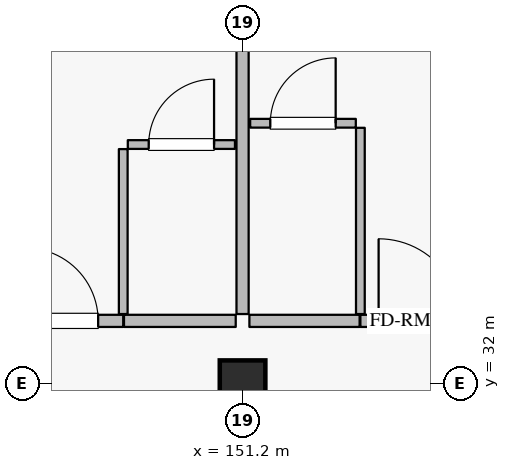
"""IFC4 building model, lengths in metres.
Left out: names, types, materials, properties, quantities, classifications, styles, units other than length and angle.
Written with IfcOpenShell. Run it as: python <this file> out.ifc"""

import sys

from ifc_helpers import new_model, si_unit, direction, frame, frame_2d, origin, origin_2d, place, context, subcontext, project, spatial, rectangle, extrude, element, fill, save


model = new_model("IFC4")
c1 = context("Model", 3, precision=1e-05, world=origin(), true_north=direction((0.0, 1.0)))
c2 = subcontext(c1, "Body", "Model", "MODEL_VIEW")
j1 = project(units=[si_unit("LENGTHUNIT", "METRE"), si_unit("PLANEANGLEUNIT", "RADIAN")], contexts=[c1])
p1 = place(None, origin())
s1 = spatial("IfcSite", under=j1, at=p1, CompositionType="ELEMENT")
p2 = place(p1, origin())
s2 = spatial("IfcBuilding", under=s1, at=p2, CompositionType="ELEMENT")
p3 = place(p2, frame((0.0, 0.0, 36.0)))
s3 = spatial("IfcBuildingStorey", under=s2, at=p3, CompositionType="ELEMENT", Elevation=36.0)
p4 = place(p3, frame((151.2, 32.0, 0.0), z_axis=(0.0, 0.0, 1.0), x_axis=(1.0, 0.0, 0.0)))
e1 = element("IfcColumn", 1, at=p4, inside=s3, PredefinedType="COLUMN", context=c2, shape_type="SweptSolid", body=[
    extrude(rectangle(XDim=0.6, YDim=0.6, at=origin_2d()), origin(), (0.0, 0.0, 1.0), 3.6),
])
p5 = place(p3, frame((143.15, 32.333, 0.0), z_axis=(0.0, 0.0, 1.0), x_axis=(0.724116091282, 0.689678103427, 0.0)))
e2 = element("IfcWall", 2, at=p5, inside=s3, PredefinedType="SOLIDWALL", context=c2, shape_type="SweptSolid", body=[
    extrude(rectangle(XDim=10.634, YDim=0.24, at=frame_2d((5.317, 0.0))), origin(), (0.0, 0.0, 1.0), 2.94),
])
p6 = place(p5, frame((0.16, 0.0, 0.8)))
e3 = element("IfcOpeningElement", 3, at=p6, cuts=e2, PredefinedType="OPENING", context=c2, shape_type="SweptSolid", body=[
    extrude(rectangle(XDim=1.6, YDim=1.6, at=frame_2d((0.8, 0.8))), frame((0.0, 0.13, 0.0), z_axis=(0.0, -1.0, 0.0), x_axis=(1.0, 0.0, 0.0)), (0.0, 0.0, 1.0), 0.26),
])
p7 = place(p5, frame((3.523, 0.0, 0.8)))
e4 = element("IfcOpeningElement", 4, at=p7, cuts=e2, PredefinedType="OPENING", context=c2, shape_type="SweptSolid", body=[
    extrude(rectangle(XDim=1.6, YDim=1.6, at=frame_2d((0.8, 0.8))), frame((0.0, 0.13, 0.0), z_axis=(0.0, -1.0, 0.0), x_axis=(1.0, 0.0, 0.0)), (0.0, 0.0, 1.0), 0.26),
])
p8 = place(p5, frame((7.88, 0.0, 0.8)))
e5 = element("IfcOpeningElement", 5, at=p8, cuts=e2, PredefinedType="OPENING", context=c2, shape_type="SweptSolid", body=[
    extrude(rectangle(XDim=1.6, YDim=1.6, at=frame_2d((0.8, 0.8))), frame((0.0, 0.13, 0.0), z_axis=(0.0, -1.0, 0.0), x_axis=(1.0, 0.0, 0.0)), (0.0, 0.0, 1.0), 0.26),
])
p9 = place(p3, frame((148.01, 32.82, 0.0), z_axis=(0.0, 0.0, 1.0), x_axis=(1.0, 0.0, 0.0)))
e6 = element("IfcWall", 6, at=p9, inside=s3, PredefinedType="PARTITIONING", context=c2, shape_type="SweptSolid", body=[
    extrude(rectangle(XDim=1.62, YDim=0.16, at=frame_2d((0.81, 0.0))), origin(), (0.0, 0.0, 1.0), 3.365),
])
p10 = place(p9, frame((0.33, 0.0, 0.0)))
e7 = element("IfcOpeningElement", 7, at=p10, cuts=e6, PredefinedType="OPENING", context=c2, shape_type="SweptSolid", body=[
    extrude(rectangle(XDim=0.96, YDim=2.2, at=frame_2d((0.48, 1.1))), frame((0.0, 0.09, 0.0), z_axis=(0.0, -1.0, 0.0), x_axis=(1.0, 0.0, 0.0)), (0.0, 0.0, 1.0), 0.18),
])
p11 = place(p3, frame((149.64, 32.82, 0.0), z_axis=(0.0, 0.0, 1.0), x_axis=(1.0, 0.0, 0.0)))
e8 = element("IfcWall", 8, at=p11, inside=s3, PredefinedType="PARTITIONING", context=c2, shape_type="SweptSolid", body=[
    extrude(rectangle(XDim=1.47, YDim=0.16, at=frame_2d((0.735, 0.0))), origin(), (0.0, 0.0, 1.0), 3.365),
])
p12 = place(p3, frame((149.63, 32.91, 0.0), z_axis=(0.0, 0.0, 1.0), x_axis=(0.0, 1.0, 0.0)))
e9 = element("IfcWall", 9, at=p12, inside=s3, PredefinedType="PARTITIONING", context=c2, shape_type="SweptSolid", body=[
    extrude(rectangle(XDim=2.17, YDim=0.115, at=frame_2d((1.085, 0.0))), origin(), (0.0, 0.0, 1.0), 3.365),
])
p13 = place(p3, frame((149.69, 35.14, 0.0), z_axis=(0.0, 0.0, 1.0), x_axis=(1.0, 0.0, 0.0)))
e10 = element("IfcWall", 10, at=p13, inside=s3, PredefinedType="PARTITIONING", context=c2, shape_type="SweptSolid", body=[
    extrude(rectangle(XDim=1.41, YDim=0.115, at=frame_2d((0.705, 0.0))), origin(), (0.0, 0.0, 1.0), 3.365),
])
p14 = place(p13, frame((0.275, 0.0, 0.0)))
e11 = element("IfcOpeningElement", 11, at=p14, cuts=e10, PredefinedType="OPENING", context=c2, shape_type="SweptSolid", body=[
    extrude(rectangle(XDim=0.86, YDim=2.12, at=frame_2d((0.43, 1.06))), frame((0.0, 0.067, 0.0), z_axis=(0.0, -1.0, 0.0), x_axis=(1.0, 0.0, 0.0)), (0.0, 0.0, 1.0), 0.135),
])
p15 = place(p3, frame((151.29, 32.82, 0.0), z_axis=(0.0, 0.0, 1.0), x_axis=(1.0, 0.0, 0.0)))
e12 = element("IfcWall", 12, at=p15, inside=s3, PredefinedType="PARTITIONING", context=c2, shape_type="SweptSolid", body=[
    extrude(rectangle(XDim=1.45, YDim=0.16, at=frame_2d((0.725, 0.0))), origin(), (0.0, 0.0, 1.0), 3.365),
])
p16 = place(p3, frame((152.75, 32.82, 0.0), z_axis=(0.0, 0.0, 1.0), x_axis=(1.0, 0.0, 0.0)))
e13 = element("IfcWall", 13, at=p16, inside=s3, PredefinedType="PARTITIONING", context=c2, shape_type="SweptSolid", body=[
    extrude(rectangle(XDim=1.56, YDim=0.16, at=frame_2d((0.78, 0.0))), origin(), (0.0, 0.0, 1.0), 3.365),
])
p17 = place(p16, frame((0.24, 0.0, 0.0)))
e14 = element("IfcOpeningElement", 14, at=p17, cuts=e13, PredefinedType="OPENING", context=c2, shape_type="SweptSolid", body=[
    extrude(rectangle(XDim=1.08, YDim=2.3, at=frame_2d((0.54, 1.15))), frame((0.0, 0.09, 0.0), z_axis=(0.0, -1.0, 0.0), x_axis=(1.0, 0.0, 0.0)), (0.0, 0.0, 1.0), 0.18),
])
p18 = place(p3, frame((152.75, 32.91, 0.0), z_axis=(0.0, 0.0, 1.0), x_axis=(0.0, 1.0, 0.0)))
e15 = element("IfcWall", 15, at=p18, inside=s3, PredefinedType="PARTITIONING", context=c2, shape_type="SweptSolid", body=[
    extrude(rectangle(XDim=2.45, YDim=0.115, at=frame_2d((1.225, 0.0))), origin(), (0.0, 0.0, 1.0), 3.365),
])
p19 = place(p3, frame((151.3, 35.42, 0.0), z_axis=(0.0, 0.0, 1.0), x_axis=(1.0, 0.0, 0.0)))
e16 = element("IfcWall", 16, at=p19, inside=s3, PredefinedType="PARTITIONING", context=c2, shape_type="SweptSolid", body=[
    extrude(rectangle(XDim=1.39, YDim=0.115, at=frame_2d((0.695, 0.0))), origin(), (0.0, 0.0, 1.0), 3.365),
])
p20 = place(p19, frame((0.265, 0.0, 0.0)))
e17 = element("IfcOpeningElement", 17, at=p20, cuts=e16, PredefinedType="OPENING", context=c2, shape_type="SweptSolid", body=[
    extrude(rectangle(XDim=0.86, YDim=2.12, at=frame_2d((0.43, 1.06))), frame((0.0, 0.067, 0.0), z_axis=(0.0, -1.0, 0.0), x_axis=(1.0, 0.0, 0.0)), (0.0, 0.0, 1.0), 0.135),
])
p21 = place(p3, frame((151.2, 32.91, 0.0), z_axis=(0.0, 0.0, 1.0), x_axis=(0.0, 1.0, 0.0)))
e18 = element("IfcWall", 18, at=p21, inside=s3, PredefinedType="PARTITIONING", context=c2, shape_type="SweptSolid", body=[
    extrude(rectangle(XDim=6.75, YDim=0.16, at=frame_2d((3.375, 0.0))), origin(), (0.0, 0.0, 1.0), 2.74),
])
p22 = place(p10, origin())
e19 = element("IfcDoor", 19, at=p22, inside=s3, OperationType="SINGLE_SWING_LEFT", PredefinedType="DOOR", context=c2, shape_type="SweptSolid", body=[
    extrude(rectangle(XDim=0.96, YDim=2.2, at=frame_2d((0.48, 1.1))), frame((0.0, 0.025, 0.0), z_axis=(0.0, -1.0, 0.0), x_axis=(1.0, 0.0, 0.0)), (0.0, 0.0, 1.0), 0.05),
])
fill(e7, e19)
p23 = place(p14, origin())
e20 = element("IfcDoor", 20, at=p23, inside=s3, OperationType="SINGLE_SWING_RIGHT", PredefinedType="DOOR", context=c2, shape_type="SweptSolid", body=[
    extrude(rectangle(XDim=0.86, YDim=2.12, at=frame_2d((0.43, 1.06))), frame((0.0, 0.025, 0.0), z_axis=(0.0, -1.0, 0.0), x_axis=(1.0, 0.0, 0.0)), (0.0, 0.0, 1.0), 0.05),
])
fill(e11, e20)
p24 = place(p17, origin())
e21 = element("IfcDoor", 21, at=p24, inside=s3, OperationType="SINGLE_SWING_LEFT", PredefinedType="DOOR", context=c2, shape_type="SweptSolid", body=[
    extrude(rectangle(XDim=1.08, YDim=2.3, at=frame_2d((0.54, 1.15))), frame((0.0, 0.025, 0.0), z_axis=(0.0, -1.0, 0.0), x_axis=(1.0, 0.0, 0.0)), (0.0, 0.0, 1.0), 0.05),
])
fill(e14, e21)
p25 = place(p20, origin())
e22 = element("IfcDoor", 22, at=p25, inside=s3, OperationType="SINGLE_SWING_RIGHT", PredefinedType="DOOR", context=c2, shape_type="SweptSolid", body=[
    extrude(rectangle(XDim=0.86, YDim=2.12, at=frame_2d((0.43, 1.06))), frame((0.0, 0.025, 0.0), z_axis=(0.0, -1.0, 0.0), x_axis=(1.0, 0.0, 0.0)), (0.0, 0.0, 1.0), 0.05),
])
fill(e17, e22)
save(model, sys.argv[1])
